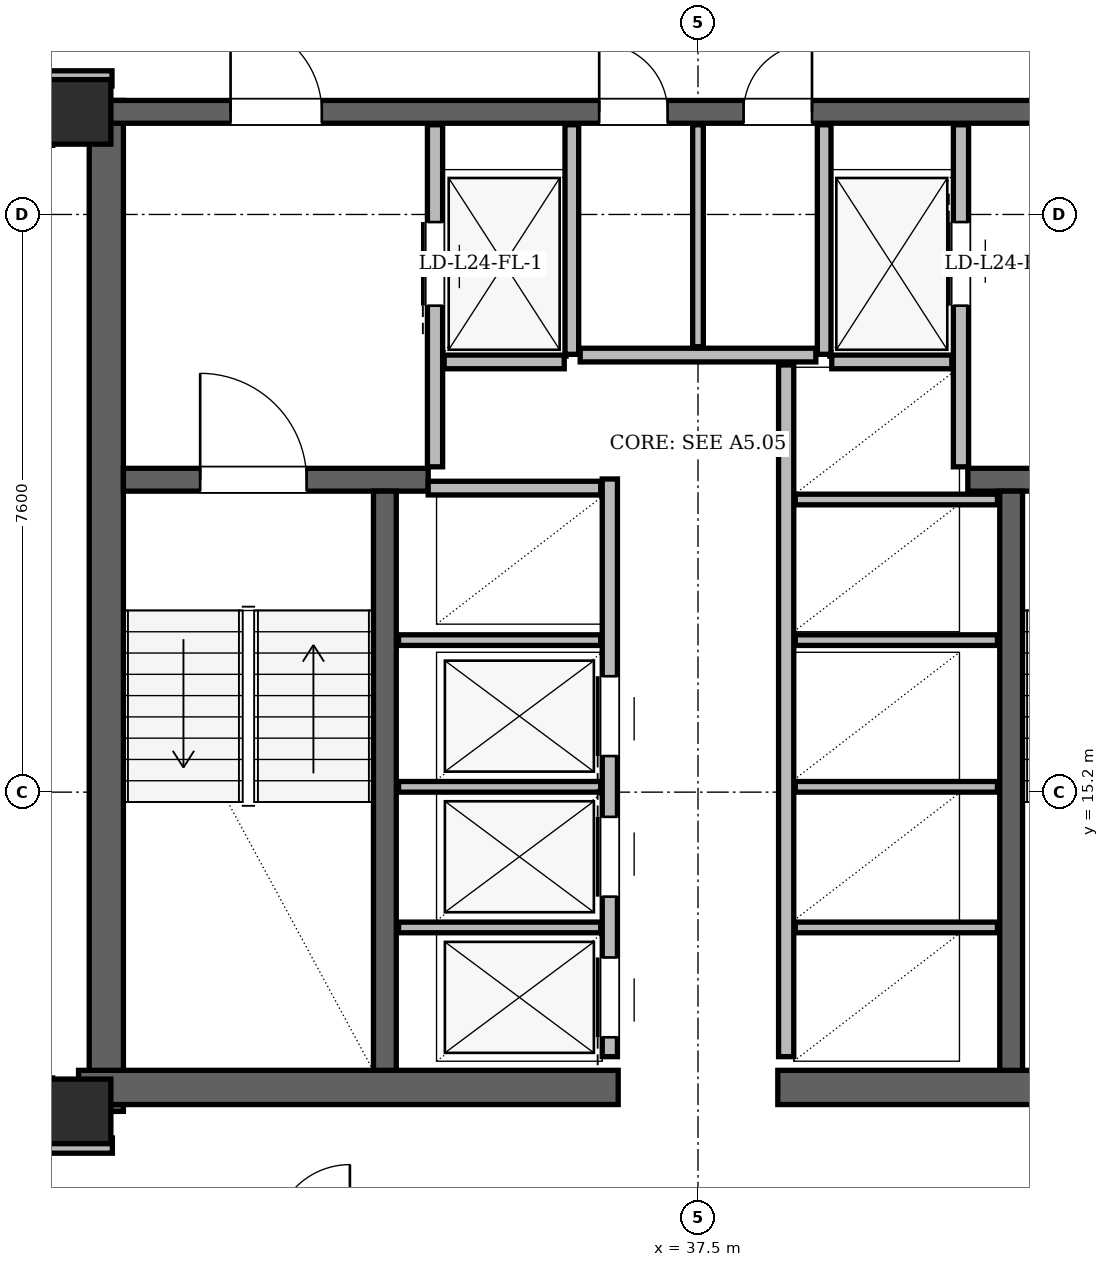
"""IFC4 building model, lengths in metres.
Left out: names, types, materials, properties, quantities, classifications, styles, units other than length and angle.
Written with IfcOpenShell. Run it as: python <this file> out.ifc"""

import sys

from ifc_helpers import new_model, si_unit, direction, frame, frame_2d, origin, origin_2d, place, context, subcontext, project, spatial, rectangle, hollow_rectangle, extrude, element, fill, save


model = new_model("IFC4")
c1 = context("Model", 3, precision=1e-05, world=origin(), true_north=direction((0.0, 1.0)))
c2 = subcontext(c1, "Body", "Model", "MODEL_VIEW")
j1 = project(units=[si_unit("LENGTHUNIT", "METRE"), si_unit("PLANEANGLEUNIT", "RADIAN")], contexts=[c1])
p1 = place(None, origin())
s1 = spatial("IfcSite", under=j1, at=p1, CompositionType="ELEMENT")
p2 = place(p1, origin())
s2 = spatial("IfcBuilding", under=s1, at=p2, CompositionType="ELEMENT")
p3 = place(p2, frame((0.0, 0.0, 93.3)))
s3 = spatial("IfcBuildingStorey", under=s2, at=p3, CompositionType="ELEMENT", Elevation=93.3)
for number, where, z_axis, x_axis in (
    (1, (29.35, 11.0, 0.0), (0.0, 0.0, 1.0), (1.0, 0.0, 0.0)),
    (2, (29.35, 24.15, 0.0), (0.0, 0.0, 1.0), (1.0, 0.0, 0.0)),
):
    element("IfcColumn", number, at=place(p3, frame(where, z_axis=z_axis, x_axis=x_axis)), inside=s3, PredefinedType="COLUMN", context=c2, shape_type="SweptSolid", body=[
        extrude(hollow_rectangle(XDim=0.85, YDim=0.85, WallThickness=0.07, at=origin_2d()), origin(), (0.0, 0.0, 1.0), 3.6),
    ])
p4 = place(p3, frame((29.715, 11.0, 0.0), z_axis=(0.0, 0.0, 1.0), x_axis=(0.0, 1.0, 0.0)))
e3 = element("IfcWall", 3, at=p4, inside=s3, PredefinedType="SHEAR", context=c2, shape_type="SweptSolid", body=[
    extrude(rectangle(XDim=13.3, YDim=0.45, at=frame_2d((6.65, 0.0))), origin(), (0.0, 0.0, 1.0), 3.36),
])
for number, where, z_axis, x_axis in (
    (4, (29.35, 11.315, 0.0), (0.0, 0.0, 1.0), (1.0, 0.0, 0.0)),
    (5, (38.55, 11.315, 0.0), (0.0, 0.0, 1.0), (1.0, 0.0, 0.0)),
):
    element("IfcWall", number, at=place(p3, frame(where, z_axis=z_axis, x_axis=x_axis)), inside=s3, PredefinedType="SHEAR", context=c2, shape_type="SweptSolid", body=[
        extrude(rectangle(XDim=7.1, YDim=0.45, at=frame_2d((3.55, 0.0))), origin(), (0.0, 0.0, 1.0), 3.36),
    ])
p5 = place(p3, frame((29.65, 24.15, 0.0), z_axis=(0.0, 0.0, 1.0), x_axis=(1.0, 0.0, 0.0)))
e6 = element("IfcWall", 6, at=p5, inside=s3, PredefinedType="SHEAR", context=c2, shape_type="SweptSolid", body=[
    extrude(rectangle(XDim=15.7, YDim=0.3, at=frame_2d((7.85, 0.0))), origin(), (0.0, 0.0, 1.0), 3.36),
])
p6 = place(p5, frame((1.7, 0.0, 0.0)))
e7 = element("IfcOpeningElement", 7, at=p6, cuts=e6, PredefinedType="OPENING", context=c2, shape_type="SweptSolid", body=[
    extrude(rectangle(XDim=1.2, YDim=2.2, at=frame_2d((0.6, 1.1))), frame((0.0, 0.15, 0.0), z_axis=(0.0, -1.0, 0.0), x_axis=(1.0, 0.0, 0.0)), (0.0, 0.0, 1.0), 0.3),
])
p7 = place(p5, frame((12.8, 0.0, 0.0)))
e8 = element("IfcOpeningElement", 8, at=p7, cuts=e6, PredefinedType="OPENING", context=c2, shape_type="SweptSolid", body=[
    extrude(rectangle(XDim=1.2, YDim=2.2, at=frame_2d((0.6, 1.1))), frame((0.0, 0.15, 0.0), z_axis=(0.0, -1.0, 0.0), x_axis=(1.0, 0.0, 0.0)), (0.0, 0.0, 1.0), 0.3),
])
p8 = place(p5, frame((6.55, 0.0, 0.0)))
e9 = element("IfcOpeningElement", 9, at=p8, cuts=e6, PredefinedType="OPENING", context=c2, shape_type="SweptSolid", body=[
    extrude(rectangle(XDim=0.9, YDim=2.05, at=frame_2d((0.45, 1.025))), frame((0.0, 0.15, 0.0), z_axis=(0.0, -1.0, 0.0), x_axis=(1.0, 0.0, 0.0)), (0.0, 0.0, 1.0), 0.3),
])
p9 = place(p5, frame((8.45, 0.0, 0.0)))
e10 = element("IfcOpeningElement", 10, at=p9, cuts=e6, PredefinedType="OPENING", context=c2, shape_type="SweptSolid", body=[
    extrude(rectangle(XDim=0.9, YDim=2.05, at=frame_2d((0.45, 1.025))), frame((0.0, 0.15, 0.0), z_axis=(0.0, -1.0, 0.0), x_axis=(1.0, 0.0, 0.0)), (0.0, 0.0, 1.0), 0.3),
])
p10 = place(p3, frame((29.94, 19.31, 0.0), z_axis=(0.0, 0.0, 1.0), x_axis=(1.0, 0.0, 0.0)))
e11 = element("IfcWall", 11, at=p10, inside=s3, PredefinedType="SHEAR", context=c2, shape_type="SweptSolid", body=[
    extrude(rectangle(XDim=4.01, YDim=0.3, at=frame_2d((2.005, 0.0))), origin(), (0.0, 0.0, 1.0), 3.36),
])
p11 = place(p10, frame((1.01, 0.0, 0.0)))
e12 = element("IfcOpeningElement", 12, at=p11, cuts=e11, PredefinedType="OPENING", context=c2, shape_type="SweptSolid", body=[
    extrude(rectangle(XDim=1.4, YDim=2.2, at=frame_2d((0.7, 1.1))), frame((0.0, 0.15, 0.0), z_axis=(0.0, -1.0, 0.0), x_axis=(1.0, 0.0, 0.0)), (0.0, 0.0, 1.0), 0.3),
])
p12 = place(p3, frame((41.05, 19.31, 0.0), z_axis=(0.0, 0.0, 1.0), x_axis=(1.0, 0.0, 0.0)))
e13 = element("IfcWall", 13, at=p12, inside=s3, PredefinedType="SHEAR", context=c2, shape_type="SweptSolid", body=[
    extrude(rectangle(XDim=4.01, YDim=0.3, at=frame_2d((2.005, 0.0))), origin(), (0.0, 0.0, 1.0), 3.36),
])
p13 = place(p12, frame((1.6, 0.0, 0.0)))
e14 = element("IfcOpeningElement", 14, at=p13, cuts=e13, PredefinedType="OPENING", context=c2, shape_type="SweptSolid", body=[
    extrude(rectangle(XDim=1.4, YDim=2.2, at=frame_2d((0.7, 1.1))), frame((0.0, 0.15, 0.0), z_axis=(0.0, -1.0, 0.0), x_axis=(1.0, 0.0, 0.0)), (0.0, 0.0, 1.0), 0.3),
])
for number, where, z_axis, x_axis in (
    (15, (33.38, 11.54, 0.0), (0.0, 0.0, 1.0), (0.0, 1.0, 0.0)),
    (16, (41.62, 11.54, 0.0), (0.0, 0.0, 1.0), (0.0, 1.0, 0.0)),
):
    element("IfcWall", number, at=place(p3, frame(where, z_axis=z_axis, x_axis=x_axis)), inside=s3, PredefinedType="SHEAR", context=c2, shape_type="SweptSolid", body=[
        extrude(rectangle(XDim=7.62, YDim=0.3, at=frame_2d((3.81, 0.0))), origin(), (0.0, 0.0, 1.0), 3.36),
    ])
p14 = place(p3, frame((31.375, 43.472, 0.0), z_axis=(0.0, 0.0, 1.0), x_axis=(-0.499996390212, -0.866027487886, 0.0)))
e17 = element("IfcWall", 17, at=p14, inside=s3, PredefinedType="SOLIDWALL", context=c2, shape_type="SweptSolid", body=[
    extrude(rectangle(XDim=34.356, YDim=0.34, at=frame_2d((17.178, 0.0))), origin(), (0.0, 0.0, 1.0), 2.578),
])
p15 = place(p14, frame((7.824, 0.0, 0.0)))
e18 = element("IfcOpeningElement", 18, at=p15, cuts=e17, PredefinedType="OPENING", context=c2, shape_type="SweptSolid", body=[
    extrude(rectangle(XDim=1.5, YDim=2.2, at=frame_2d((0.75, 1.1))), frame((0.0, 0.17, 0.0), z_axis=(0.0, -1.0, 0.0), x_axis=(1.0, 0.0, 0.0)), (0.0, 0.0, 1.0), 0.34),
])
p16 = place(p14, frame((25.647, 0.0, 0.0)))
e19 = element("IfcOpeningElement", 19, at=p16, cuts=e17, PredefinedType="OPENING", context=c2, shape_type="SweptSolid", body=[
    extrude(rectangle(XDim=1.5, YDim=2.2, at=frame_2d((0.75, 1.1))), frame((0.0, 0.17, 0.0), z_axis=(0.0, -1.0, 0.0), x_axis=(1.0, 0.0, 0.0)), (0.0, 0.0, 1.0), 0.34),
])
p17 = place(p14, frame((30.715, 0.0, 0.85)))
e20 = element("IfcOpeningElement", 20, at=p17, cuts=e17, PredefinedType="OPENING", context=c2, shape_type="SweptSolid", body=[
    extrude(rectangle(XDim=1.4, YDim=1.6, at=frame_2d((0.7, 0.8))), frame((0.0, 0.17, 0.0), z_axis=(0.0, -1.0, 0.0), x_axis=(1.0, 0.0, 0.0)), (0.0, 0.0, 1.0), 0.34),
])
p18 = place(p14, frame((1.038, 0.0, 0.85)))
e21 = element("IfcOpeningElement", 21, at=p18, cuts=e17, PredefinedType="OPENING", context=c2, shape_type="SweptSolid", body=[
    extrude(rectangle(XDim=2.8, YDim=1.618, at=frame_2d((1.4, 0.809))), frame((0.0, 0.17, 0.0), z_axis=(0.0, -1.0, 0.0), x_axis=(1.0, 0.0, 0.0)), (0.0, 0.0, 1.0), 0.34),
])
p19 = place(p14, frame((12.775, 0.0, 0.85)))
e22 = element("IfcOpeningElement", 22, at=p19, cuts=e17, PredefinedType="OPENING", context=c2, shape_type="SweptSolid", body=[
    extrude(rectangle(XDim=2.2, YDim=1.618, at=frame_2d((1.1, 0.809))), frame((0.0, 0.17, 0.0), z_axis=(0.0, -1.0, 0.0), x_axis=(1.0, 0.0, 0.0)), (0.0, 0.0, 1.0), 0.34),
])
p20 = place(p14, frame((18.07, 0.0, 0.85)))
e23 = element("IfcOpeningElement", 23, at=p20, cuts=e17, PredefinedType="OPENING", context=c2, shape_type="SweptSolid", body=[
    extrude(rectangle(XDim=1.2, YDim=1.48, at=frame_2d((0.6, 0.74))), frame((0.0, 0.17, 0.0), z_axis=(0.0, -1.0, 0.0), x_axis=(1.0, 0.0, 0.0)), (0.0, 0.0, 1.0), 0.34),
])
p21 = place(p3, frame((34.04, 19.48, 0.0), z_axis=(0.0, 0.0, 1.0), x_axis=(0.0, 1.0, 0.0)))
e24 = element("IfcWall", 24, at=p21, inside=s3, PredefinedType="PARTITIONING", context=c2, shape_type="SweptSolid", body=[
    extrude(rectangle(XDim=4.5, YDim=0.2, at=frame_2d((2.25, 0.0))), origin(), (0.0, 0.0, 1.0), 2.4),
])
p22 = place(p21, frame((2.12, 0.0, 0.0)))
e25 = element("IfcOpeningElement", 25, at=p22, cuts=e24, PredefinedType="OPENING", context=c2, shape_type="SweptSolid", body=[
    extrude(rectangle(XDim=1.1, YDim=2.2, at=frame_2d((0.55, 1.1))), frame((0.0, 0.1, 0.0), z_axis=(0.0, -1.0, 0.0), x_axis=(1.0, 0.0, 0.0)), (0.0, 0.0, 1.0), 0.2),
])
p23 = place(p3, frame((35.84, 20.96, 0.0), z_axis=(0.0, 0.0, 1.0), x_axis=(0.0, 1.0, 0.0)))
e26 = element("IfcWall", 26, at=p23, inside=s3, PredefinedType="PARTITIONING", context=c2, shape_type="SweptSolid", body=[
    extrude(rectangle(XDim=3.02, YDim=0.18, at=frame_2d((1.51, 0.0))), origin(), (0.0, 0.0, 1.0), 2.4),
])
p24 = place(p3, frame((34.16, 20.86, 0.0), z_axis=(0.0, 0.0, 1.0), x_axis=(1.0, 0.0, 0.0)))
e27 = element("IfcWall", 27, at=p24, inside=s3, PredefinedType="PARTITIONING", context=c2, shape_type="SweptSolid", body=[
    extrude(rectangle(XDim=1.58, YDim=0.18, at=frame_2d((0.79, 0.0))), origin(), (0.0, 0.0, 1.0), 3.36),
])
p25 = place(p3, frame((40.96, 19.48, 0.0), z_axis=(0.0, 0.0, 1.0), x_axis=(0.0, 1.0, 0.0)))
e28 = element("IfcWall", 28, at=p25, inside=s3, PredefinedType="PARTITIONING", context=c2, shape_type="SweptSolid", body=[
    extrude(rectangle(XDim=4.5, YDim=0.2, at=frame_2d((2.25, 0.0))), origin(), (0.0, 0.0, 1.0), 2.4),
])
p26 = place(p25, frame((2.12, 0.0, 0.0)))
e29 = element("IfcOpeningElement", 29, at=p26, cuts=e28, PredefinedType="OPENING", context=c2, shape_type="SweptSolid", body=[
    extrude(rectangle(XDim=1.1, YDim=2.2, at=frame_2d((0.55, 1.1))), frame((0.0, 0.1, 0.0), z_axis=(0.0, -1.0, 0.0), x_axis=(1.0, 0.0, 0.0)), (0.0, 0.0, 1.0), 0.2),
])
p27 = place(p3, frame((39.16, 20.96, 0.0), z_axis=(0.0, 0.0, 1.0), x_axis=(0.0, 1.0, 0.0)))
e30 = element("IfcWall", 30, at=p27, inside=s3, PredefinedType="PARTITIONING", context=c2, shape_type="SweptSolid", body=[
    extrude(rectangle(XDim=3.02, YDim=0.18, at=frame_2d((1.51, 0.0))), origin(), (0.0, 0.0, 1.0), 2.4),
])
p28 = place(p3, frame((39.26, 20.86, 0.0), z_axis=(0.0, 0.0, 1.0), x_axis=(1.0, 0.0, 0.0)))
e31 = element("IfcWall", 31, at=p28, inside=s3, PredefinedType="PARTITIONING", context=c2, shape_type="SweptSolid", body=[
    extrude(rectangle(XDim=1.58, YDim=0.18, at=frame_2d((0.79, 0.0))), origin(), (0.0, 0.0, 1.0), 3.36),
])
p29 = place(p3, frame((36.34, 11.72, 0.0), z_axis=(0.0, 0.0, 1.0), x_axis=(0.0, 1.0, 0.0)))
e32 = element("IfcWall", 32, at=p29, inside=s3, PredefinedType="PARTITIONING", context=c2, shape_type="SweptSolid", body=[
    extrude(rectangle(XDim=7.6, YDim=0.2, at=frame_2d((3.8, 0.0))), origin(), (0.0, 0.0, 1.0), 3.36),
])
p30 = place(p29, frame((0.255, 0.0, 0.0)))
e33 = element("IfcOpeningElement", 33, at=p30, cuts=e32, PredefinedType="OPENING", context=c2, shape_type="SweptSolid", body=[
    extrude(rectangle(XDim=1.05, YDim=2.15, at=frame_2d((0.525, 1.075))), frame((0.0, 0.1, 0.0), z_axis=(0.0, -1.0, 0.0), x_axis=(1.0, 0.0, 0.0)), (0.0, 0.0, 1.0), 0.2),
])
p31 = place(p29, frame((2.105, 0.0, 0.0)))
e34 = element("IfcOpeningElement", 34, at=p31, cuts=e32, PredefinedType="OPENING", context=c2, shape_type="SweptSolid", body=[
    extrude(rectangle(XDim=1.05, YDim=2.15, at=frame_2d((0.525, 1.075))), frame((0.0, 0.1, 0.0), z_axis=(0.0, -1.0, 0.0), x_axis=(1.0, 0.0, 0.0)), (0.0, 0.0, 1.0), 0.2),
])
p32 = place(p29, frame((3.955, 0.0, 0.0)))
e35 = element("IfcOpeningElement", 35, at=p32, cuts=e32, PredefinedType="OPENING", context=c2, shape_type="SweptSolid", body=[
    extrude(rectangle(XDim=1.05, YDim=2.15, at=frame_2d((0.525, 1.075))), frame((0.0, 0.1, 0.0), z_axis=(0.0, -1.0, 0.0), x_axis=(1.0, 0.0, 0.0)), (0.0, 0.0, 1.0), 0.2),
])
p33 = place(p3, frame((33.95, 19.2, 0.0), z_axis=(0.0, 0.0, 1.0), x_axis=(1.0, 0.0, 0.0)))
e36 = element("IfcWall", 36, at=p33, inside=s3, PredefinedType="PARTITIONING", context=c2, shape_type="SweptSolid", body=[
    extrude(rectangle(XDim=2.27, YDim=0.18, at=frame_2d((1.135, 0.0))), origin(), (0.0, 0.0, 1.0), 3.36),
])
for number, where, z_axis, x_axis in (
    (37, (33.56, 13.42, 0.0), (0.0, 0.0, 1.0), (1.0, 0.0, 0.0)),
    (38, (33.56, 15.27, 0.0), (0.0, 0.0, 1.0), (1.0, 0.0, 0.0)),
    (39, (33.56, 17.2, 0.0), (0.0, 0.0, 1.0), (1.0, 0.0, 0.0)),
):
    element("IfcWall", number, at=place(p3, frame(where, z_axis=z_axis, x_axis=x_axis)), inside=s3, PredefinedType="PARTITIONING", context=c2, shape_type="SweptSolid", body=[
        extrude(rectangle(XDim=2.66, YDim=0.14, at=frame_2d((1.33, 0.0))), origin(), (0.0, 0.0, 1.0), 3.36),
    ])
p34 = place(p3, frame((38.66, 11.72, 0.0), z_axis=(0.0, 0.0, 1.0), x_axis=(0.0, 1.0, 0.0)))
e40 = element("IfcWall", 40, at=p34, inside=s3, PredefinedType="PARTITIONING", context=c2, shape_type="SweptSolid", body=[
    extrude(rectangle(XDim=9.1, YDim=0.2, at=frame_2d((4.55, 0.0))), origin(), (0.0, 0.0, 1.0), 3.36),
])
for number, where, z_axis, x_axis in (
    (41, (38.78, 13.42, 0.0), (0.0, 0.0, 1.0), (1.0, 0.0, 0.0)),
    (42, (38.78, 15.27, 0.0), (0.0, 0.0, 1.0), (1.0, 0.0, 0.0)),
    (43, (38.78, 17.2, 0.0), (0.0, 0.0, 1.0), (1.0, 0.0, 0.0)),
    (44, (38.78, 19.05, 0.0), (0.0, 0.0, 1.0), (1.0, 0.0, 0.0)),
):
    element("IfcWall", number, at=place(p3, frame(where, z_axis=z_axis, x_axis=x_axis)), inside=s3, PredefinedType="PARTITIONING", context=c2, shape_type="SweptSolid", body=[
        extrude(rectangle(XDim=2.66, YDim=0.14, at=frame_2d((1.33, 0.0))), origin(), (0.0, 0.0, 1.0), 3.36),
    ])
p35 = place(p3, frame((35.95, 20.95, 0.0), z_axis=(0.0, 0.0, 1.0), x_axis=(1.0, 0.0, 0.0)))
e45 = element("IfcWall", 45, at=p35, inside=s3, PredefinedType="PARTITIONING", context=c2, shape_type="SweptSolid", body=[
    extrude(rectangle(XDim=3.1, YDim=0.18, at=frame_2d((1.55, 0.0))), origin(), (0.0, 0.0, 1.0), 3.36),
])
p36 = place(p3, frame((37.5, 21.06, 0.0), z_axis=(0.0, 0.0, 1.0), x_axis=(0.0, 1.0, 0.0)))
e46 = element("IfcWall", 46, at=p36, inside=s3, PredefinedType="PARTITIONING", context=c2, shape_type="SweptSolid", body=[
    extrude(rectangle(XDim=2.92, YDim=0.14, at=frame_2d((1.46, 0.0))), origin(), (0.0, 0.0, 1.0), 2.4),
])
p37 = place(p3, frame((28.905, 10.55, 0.0), z_axis=(0.0, 0.0, 1.0), x_axis=(1.0, 0.0, 0.0)))
e47 = element("IfcWall", 47, at=p37, inside=s3, PredefinedType="PARTITIONING", context=c2, shape_type="SweptSolid", body=[
    extrude(rectangle(XDim=0.89, YDim=0.2, at=frame_2d((0.445, 0.0))), origin(), (0.0, 0.0, 1.0), 3.36),
])
p38 = place(p3, frame((28.91, 24.59, 0.0), z_axis=(0.0, 0.0, 1.0), x_axis=(1.0, 0.0, 0.0)))
e48 = element("IfcWall", 48, at=p38, inside=s3, PredefinedType="PARTITIONING", context=c2, shape_type="SweptSolid", body=[
    extrude(rectangle(XDim=0.88, YDim=0.2, at=frame_2d((0.44, 0.0))), origin(), (0.0, 0.0, 1.0), 2.814),
])
p39 = place(p3, frame((28.91, 10.654, 0.0), z_axis=(0.0, 0.0, 1.0), x_axis=(0.0, 1.0, 0.0)))
e49 = element("IfcWall", 49, at=p39, inside=s3, PredefinedType="PARTITIONING", context=c2, shape_type="SweptSolid", body=[
    extrude(rectangle(XDim=0.786, YDim=0.2, at=frame_2d((0.393, 0.0))), origin(), (0.0, 0.0, 1.0), 2.814),
])
p40 = place(p3, frame((28.91, 23.71, 0.0), z_axis=(0.0, 0.0, 1.0), x_axis=(0.0, 1.0, 0.0)))
e50 = element("IfcWall", 50, at=p40, inside=s3, PredefinedType="PARTITIONING", context=c2, shape_type="SweptSolid", body=[
    extrude(rectangle(XDim=0.61, YDim=0.2, at=frame_2d((0.305, 0.0))), origin(), (0.0, 0.0, 1.0), 3.36),
])
p41 = place(p22, origin())
e51 = element("IfcDoor", 51, at=p41, inside=s3, OperationType="SLIDING_TO_LEFT", PredefinedType="DOOR", context=c2, shape_type="SweptSolid", body=[
    extrude(rectangle(XDim=1.1, YDim=2.2, at=frame_2d((0.55, 1.1))), frame((0.0, 0.025, 0.0), z_axis=(0.0, -1.0, 0.0), x_axis=(1.0, 0.0, 0.0)), (0.0, 0.0, 1.0), 0.05),
])
fill(e25, e51)
p42 = place(p26, origin())
e52 = element("IfcDoor", 52, at=p42, inside=s3, OperationType="SLIDING_TO_RIGHT", PredefinedType="DOOR", context=c2, shape_type="SweptSolid", body=[
    extrude(rectangle(XDim=1.1, YDim=2.2, at=frame_2d((0.55, 1.1))), frame((0.0, 0.025, 0.0), z_axis=(0.0, -1.0, 0.0), x_axis=(1.0, 0.0, 0.0)), (0.0, 0.0, 1.0), 0.05),
])
fill(e29, e52)
p43 = place(p30, origin())
e53 = element("IfcDoor", 53, at=p43, inside=s3, OperationType="SLIDING_TO_LEFT", PredefinedType="DOOR", context=c2, shape_type="SweptSolid", body=[
    extrude(rectangle(XDim=1.05, YDim=2.15, at=frame_2d((0.525, 1.075))), frame((0.0, 0.025, 0.0), z_axis=(0.0, -1.0, 0.0), x_axis=(1.0, 0.0, 0.0)), (0.0, 0.0, 1.0), 0.05),
])
fill(e33, e53)
p44 = place(p31, origin())
e54 = element("IfcDoor", 54, at=p44, inside=s3, OperationType="SLIDING_TO_RIGHT", PredefinedType="DOOR", context=c2, shape_type="SweptSolid", body=[
    extrude(rectangle(XDim=1.05, YDim=2.15, at=frame_2d((0.525, 1.075))), frame((0.0, 0.025, 0.0), z_axis=(0.0, -1.0, 0.0), x_axis=(1.0, 0.0, 0.0)), (0.0, 0.0, 1.0), 0.05),
])
fill(e34, e54)
p45 = place(p32, origin())
e55 = element("IfcDoor", 55, at=p45, inside=s3, OperationType="SLIDING_TO_LEFT", PredefinedType="DOOR", context=c2, shape_type="SweptSolid", body=[
    extrude(rectangle(XDim=1.05, YDim=2.15, at=frame_2d((0.525, 1.075))), frame((0.0, 0.025, 0.0), z_axis=(0.0, -1.0, 0.0), x_axis=(1.0, 0.0, 0.0)), (0.0, 0.0, 1.0), 0.05),
])
fill(e35, e55)
p46 = place(p11, origin())
e56 = element("IfcDoor", 56, at=p46, inside=s3, OperationType="SINGLE_SWING_LEFT", PredefinedType="DOOR", context=c2, shape_type="SweptSolid", body=[
    extrude(rectangle(XDim=1.4, YDim=2.2, at=frame_2d((0.7, 1.1))), frame((0.0, 0.025, 0.0), z_axis=(0.0, -1.0, 0.0), x_axis=(1.0, 0.0, 0.0)), (0.0, 0.0, 1.0), 0.05),
])
fill(e12, e56)
p47 = place(p6, origin())
e57 = element("IfcDoor", 57, at=p47, inside=s3, OperationType="SINGLE_SWING_LEFT", PredefinedType="DOOR", context=c2, shape_type="SweptSolid", body=[
    extrude(rectangle(XDim=1.2, YDim=2.2, at=frame_2d((0.6, 1.1))), frame((0.0, 0.025, 0.0), z_axis=(0.0, -1.0, 0.0), x_axis=(1.0, 0.0, 0.0)), (0.0, 0.0, 1.0), 0.05),
])
fill(e7, e57)
p48 = place(p8, origin())
e58 = element("IfcDoor", 58, at=p48, inside=s3, OperationType="SINGLE_SWING_LEFT", PredefinedType="DOOR", context=c2, shape_type="SweptSolid", body=[
    extrude(rectangle(XDim=0.9, YDim=2.05, at=frame_2d((0.45, 1.025))), frame((0.0, 0.025, 0.0), z_axis=(0.0, -1.0, 0.0), x_axis=(1.0, 0.0, 0.0)), (0.0, 0.0, 1.0), 0.05),
])
fill(e9, e58)
p49 = place(p9, origin())
e59 = element("IfcDoor", 59, at=p49, inside=s3, OperationType="SINGLE_SWING_RIGHT", PredefinedType="DOOR", context=c2, shape_type="SweptSolid", body=[
    extrude(rectangle(XDim=0.9, YDim=2.05, at=frame_2d((0.45, 1.025))), frame((0.0, 0.025, 0.0), z_axis=(0.0, -1.0, 0.0), x_axis=(1.0, 0.0, 0.0)), (0.0, 0.0, 1.0), 0.05),
])
fill(e10, e59)
save(model, sys.argv[1])
